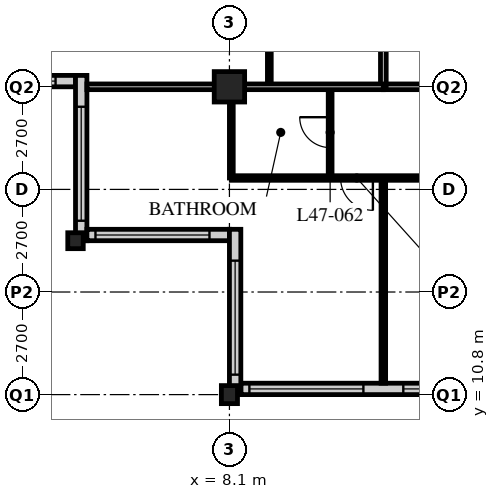
"""IFC4 building model, lengths in metres.
Left out: names, types, materials, properties, quantities, classifications, styles, units other than length and angle.
Written with IfcOpenShell. Run it as: python <this file> out.ifc"""

import sys

from ifc_helpers import new_model, si_unit, direction, frame, frame_2d, origin, origin_2d, place, context, subcontext, project, spatial, rectangle, hollow_rectangle, i_section, extrude, element, fill, save


model = new_model("IFC4")
c1 = context("Model", 3, precision=1e-05, world=origin(), true_north=direction((0.0, 1.0)))
c2 = subcontext(c1, "Body", "Model", "MODEL_VIEW")
j1 = project(units=[si_unit("LENGTHUNIT", "METRE"), si_unit("PLANEANGLEUNIT", "RADIAN")], contexts=[c1])
p1 = place(None, origin())
s1 = spatial("IfcSite", under=j1, at=p1, CompositionType="ELEMENT")
p2 = place(p1, origin())
s2 = spatial("IfcBuilding", under=s1, at=p2, CompositionType="ELEMENT")
p3 = place(p2, frame((0.0, 0.0, 184.8)))
s3 = spatial("IfcBuildingStorey", under=s2, at=p3, CompositionType="ELEMENT", Elevation=184.8)
p4 = place(p3, frame((4.05, 14.85, 0.0), z_axis=(0.0, 0.0, 1.0), x_axis=(1.0, 0.0, 0.0)))
e1 = element("IfcColumn", 1, at=p4, inside=s3, PredefinedType="COLUMN", context=c2, shape_type="SweptSolid", body=[
    extrude(i_section(OverallWidth=0.407, OverallDepth=0.419, WebThickness=0.031, FlangeThickness=0.049, FilletRadius=0.015, at=origin_2d()), origin(), (0.0, 0.0, 1.0), 3.6),
])
p5 = place(p3, frame((8.1, 10.8, 0.0), z_axis=(0.0, 0.0, 1.0), x_axis=(1.0, 0.0, 0.0)))
e2 = element("IfcColumn", 2, at=p5, inside=s3, PredefinedType="COLUMN", context=c2, shape_type="SweptSolid", body=[
    extrude(i_section(OverallWidth=0.424, OverallDepth=0.475, WebThickness=0.048, FlangeThickness=0.077, FilletRadius=0.015, at=origin_2d()), origin(), (0.0, 0.0, 1.0), 3.6),
])
p6 = place(p3, frame((8.1, 18.9, 0.0), z_axis=(0.0, 0.0, 1.0), x_axis=(1.0, 0.0, 0.0)))
e3 = element("IfcColumn", 3, at=p6, inside=s3, PredefinedType="COLUMN", context=c2, shape_type="SweptSolid", body=[
    extrude(hollow_rectangle(XDim=0.8, YDim=0.8, WallThickness=0.08, at=origin_2d()), origin(), (0.0, 0.0, 1.0), 3.6),
])
p7 = place(p3, frame((8.4, 10.95, 0.0), z_axis=(0.0, 0.0, 1.0), x_axis=(1.0, 0.0, 0.0)))
e4 = element("IfcWall", 4, at=p7, inside=s3, PredefinedType="SOLIDWALL", context=c2, shape_type="SweptSolid", body=[
    extrude(rectangle(XDim=40.2, YDim=0.3, at=frame_2d((20.1, 0.0))), origin(), (0.0, 0.0, 1.0), 3.39),
])
p8 = place(p7, frame((0.225, 0.0, 0.6)))
e5 = element("IfcOpeningElement", 5, at=p8, cuts=e4, PredefinedType="OPENING", context=c2, shape_type="SweptSolid", body=[
    extrude(rectangle(XDim=3.0, YDim=2.4, at=frame_2d((1.5, 1.2))), frame((0.0, 0.16, 0.0), z_axis=(0.0, -1.0, 0.0), x_axis=(1.0, 0.0, 0.0)), (0.0, 0.0, 1.0), 0.32),
])
p9 = place(p7, frame((4.275, 0.0, 0.6)))
e6 = element("IfcOpeningElement", 6, at=p9, cuts=e4, PredefinedType="OPENING", context=c2, shape_type="SweptSolid", body=[
    extrude(rectangle(XDim=3.0, YDim=2.4, at=frame_2d((1.5, 1.2))), frame((0.0, 0.16, 0.0), z_axis=(0.0, -1.0, 0.0), x_axis=(1.0, 0.0, 0.0)), (0.0, 0.0, 1.0), 0.32),
])
p10 = place(p7, frame((8.325, 0.0, 0.6)))
e7 = element("IfcOpeningElement", 7, at=p10, cuts=e4, PredefinedType="OPENING", context=c2, shape_type="SweptSolid", body=[
    extrude(rectangle(XDim=3.0, YDim=2.4, at=frame_2d((1.5, 1.2))), frame((0.0, 0.16, 0.0), z_axis=(0.0, -1.0, 0.0), x_axis=(1.0, 0.0, 0.0)), (0.0, 0.0, 1.0), 0.32),
])
p11 = place(p7, frame((12.375, 0.0, 0.6)))
e8 = element("IfcOpeningElement", 8, at=p11, cuts=e4, PredefinedType="OPENING", context=c2, shape_type="SweptSolid", body=[
    extrude(rectangle(XDim=3.0, YDim=2.4, at=frame_2d((1.5, 1.2))), frame((0.0, 0.16, 0.0), z_axis=(0.0, -1.0, 0.0), x_axis=(1.0, 0.0, 0.0)), (0.0, 0.0, 1.0), 0.32),
])
p12 = place(p7, frame((16.425, 0.0, 0.6)))
e9 = element("IfcOpeningElement", 9, at=p12, cuts=e4, PredefinedType="OPENING", context=c2, shape_type="SweptSolid", body=[
    extrude(rectangle(XDim=3.0, YDim=2.4, at=frame_2d((1.5, 1.2))), frame((0.0, 0.16, 0.0), z_axis=(0.0, -1.0, 0.0), x_axis=(1.0, 0.0, 0.0)), (0.0, 0.0, 1.0), 0.32),
])
p13 = place(p7, frame((20.475, 0.0, 0.6)))
e10 = element("IfcOpeningElement", 10, at=p13, cuts=e4, PredefinedType="OPENING", context=c2, shape_type="SweptSolid", body=[
    extrude(rectangle(XDim=3.0, YDim=2.4, at=frame_2d((1.5, 1.2))), frame((0.0, 0.16, 0.0), z_axis=(0.0, -1.0, 0.0), x_axis=(1.0, 0.0, 0.0)), (0.0, 0.0, 1.0), 0.32),
])
p14 = place(p7, frame((24.525, 0.0, 0.6)))
e11 = element("IfcOpeningElement", 11, at=p14, cuts=e4, PredefinedType="OPENING", context=c2, shape_type="SweptSolid", body=[
    extrude(rectangle(XDim=3.0, YDim=2.4, at=frame_2d((1.5, 1.2))), frame((0.0, 0.16, 0.0), z_axis=(0.0, -1.0, 0.0), x_axis=(1.0, 0.0, 0.0)), (0.0, 0.0, 1.0), 0.32),
])
p15 = place(p7, frame((28.575, 0.0, 0.6)))
e12 = element("IfcOpeningElement", 12, at=p15, cuts=e4, PredefinedType="OPENING", context=c2, shape_type="SweptSolid", body=[
    extrude(rectangle(XDim=3.0, YDim=2.4, at=frame_2d((1.5, 1.2))), frame((0.0, 0.16, 0.0), z_axis=(0.0, -1.0, 0.0), x_axis=(1.0, 0.0, 0.0)), (0.0, 0.0, 1.0), 0.32),
])
p16 = place(p7, frame((32.625, 0.0, 0.6)))
e13 = element("IfcOpeningElement", 13, at=p16, cuts=e4, PredefinedType="OPENING", context=c2, shape_type="SweptSolid", body=[
    extrude(rectangle(XDim=3.0, YDim=2.4, at=frame_2d((1.5, 1.2))), frame((0.0, 0.16, 0.0), z_axis=(0.0, -1.0, 0.0), x_axis=(1.0, 0.0, 0.0)), (0.0, 0.0, 1.0), 0.32),
])
p17 = place(p7, frame((36.675, 0.0, 0.6)))
e14 = element("IfcOpeningElement", 14, at=p17, cuts=e4, PredefinedType="OPENING", context=c2, shape_type="SweptSolid", body=[
    extrude(rectangle(XDim=3.0, YDim=2.4, at=frame_2d((1.5, 1.2))), frame((0.0, 0.16, 0.0), z_axis=(0.0, -1.0, 0.0), x_axis=(1.0, 0.0, 0.0)), (0.0, 0.0, 1.0), 0.32),
])
p18 = place(p3, frame((0.3, 19.05, 0.0), z_axis=(0.0, 0.0, 1.0), x_axis=(1.0, 0.0, 0.0)))
e15 = element("IfcWall", 15, at=p18, inside=s3, PredefinedType="SOLIDWALL", context=c2, shape_type="SweptSolid", body=[
    extrude(rectangle(XDim=3.75, YDim=0.3, at=frame_2d((1.875, 0.0))), origin(), (0.0, 0.0, 1.0), 3.39),
])
p19 = place(p18, frame((0.225, 0.0, 0.6)))
e16 = element("IfcOpeningElement", 16, at=p19, cuts=e15, PredefinedType="OPENING", context=c2, shape_type="SweptSolid", body=[
    extrude(rectangle(XDim=3.0, YDim=2.0, at=frame_2d((1.5, 1.0))), frame((0.0, 0.16, 0.0), z_axis=(0.0, -1.0, 0.0), x_axis=(1.0, 0.0, 0.0)), (0.0, 0.0, 1.0), 0.32),
])
p20 = place(p3, frame((4.2, 19.2, 0.0), z_axis=(0.0, 0.0, 1.0), x_axis=(0.0, -1.0, 0.0)))
e17 = element("IfcWall", 17, at=p20, inside=s3, PredefinedType="SOLIDWALL", context=c2, shape_type="SweptSolid", body=[
    extrude(rectangle(XDim=4.35, YDim=0.3, at=frame_2d((2.175, 0.0))), origin(), (0.0, 0.0, 1.0), 3.39),
])
p21 = place(p20, frame((0.825, 0.0, 0.6)))
e18 = element("IfcOpeningElement", 18, at=p21, cuts=e17, PredefinedType="OPENING", context=c2, shape_type="SweptSolid", body=[
    extrude(rectangle(XDim=3.0, YDim=2.0, at=frame_2d((1.5, 1.0))), frame((0.0, 0.16, 0.0), z_axis=(0.0, -1.0, 0.0), x_axis=(1.0, 0.0, 0.0)), (0.0, 0.0, 1.0), 0.32),
])
p22 = place(p3, frame((4.35, 15.0, 0.0), z_axis=(0.0, 0.0, 1.0), x_axis=(1.0, 0.0, 0.0)))
e19 = element("IfcWall", 19, at=p22, inside=s3, PredefinedType="SOLIDWALL", context=c2, shape_type="SweptSolid", body=[
    extrude(rectangle(XDim=3.75, YDim=0.3, at=frame_2d((1.875, 0.0))), origin(), (0.0, 0.0, 1.0), 3.39),
])
p23 = place(p22, frame((0.225, 0.0, 0.6)))
e20 = element("IfcOpeningElement", 20, at=p23, cuts=e19, PredefinedType="OPENING", context=c2, shape_type="SweptSolid", body=[
    extrude(rectangle(XDim=3.0, YDim=2.0, at=frame_2d((1.5, 1.0))), frame((0.0, 0.16, 0.0), z_axis=(0.0, -1.0, 0.0), x_axis=(1.0, 0.0, 0.0)), (0.0, 0.0, 1.0), 0.32),
])
p24 = place(p3, frame((8.25, 15.15, 0.0), z_axis=(0.0, 0.0, 1.0), x_axis=(0.0, -1.0, 0.0)))
e21 = element("IfcWall", 21, at=p24, inside=s3, PredefinedType="SOLIDWALL", context=c2, shape_type="SweptSolid", body=[
    extrude(rectangle(XDim=4.35, YDim=0.3, at=frame_2d((2.175, 0.0))), origin(), (0.0, 0.0, 1.0), 3.39),
])
p25 = place(p24, frame((0.825, 0.0, 0.6)))
e22 = element("IfcOpeningElement", 22, at=p25, cuts=e21, PredefinedType="OPENING", context=c2, shape_type="SweptSolid", body=[
    extrude(rectangle(XDim=3.0, YDim=2.0, at=frame_2d((1.5, 1.0))), frame((0.0, 0.16, 0.0), z_axis=(0.0, -1.0, 0.0), x_axis=(1.0, 0.0, 0.0)), (0.0, 0.0, 1.0), 0.32),
])
p26 = place(p3, frame((12.15, 18.9, 0.0), z_axis=(0.0, 0.0, 1.0), x_axis=(1.0, 0.0, 0.0)))
e23 = element("IfcWall", 23, at=p26, inside=s3, PredefinedType="PARTITIONING", context=c2, shape_type="SweptSolid", body=[
    extrude(rectangle(XDim=32.4, YDim=0.15, at=frame_2d((16.2, 0.0))), origin(), (0.0, 0.0, 1.0), 2.778),
])
p27 = place(p26, frame((4.95, 0.0, 0.0)))
e24 = element("IfcOpeningElement", 24, at=p27, cuts=e23, PredefinedType="OPENING", context=c2, shape_type="SweptSolid", body=[
    extrude(rectangle(XDim=1.0, YDim=2.1, at=frame_2d((0.5, 1.05))), frame((0.0, 0.085, 0.0), z_axis=(0.0, -1.0, 0.0), x_axis=(1.0, 0.0, 0.0)), (0.0, 0.0, 1.0), 0.17),
])
p28 = place(p26, frame((13.05, 0.0, 0.0)))
e25 = element("IfcOpeningElement", 25, at=p28, cuts=e23, PredefinedType="OPENING", context=c2, shape_type="SweptSolid", body=[
    extrude(rectangle(XDim=1.0, YDim=2.1, at=frame_2d((0.5, 1.05))), frame((0.0, 0.085, 0.0), z_axis=(0.0, -1.0, 0.0), x_axis=(1.0, 0.0, 0.0)), (0.0, 0.0, 1.0), 0.17),
])
p29 = place(p26, frame((21.15, 0.0, 0.0)))
e26 = element("IfcOpeningElement", 26, at=p29, cuts=e23, PredefinedType="OPENING", context=c2, shape_type="SweptSolid", body=[
    extrude(rectangle(XDim=1.0, YDim=2.1, at=frame_2d((0.5, 1.05))), frame((0.0, 0.085, 0.0), z_axis=(0.0, -1.0, 0.0), x_axis=(1.0, 0.0, 0.0)), (0.0, 0.0, 1.0), 0.17),
])
p30 = place(p26, frame((1.525, 0.0, 0.0)))
e27 = element("IfcOpeningElement", 27, at=p30, cuts=e23, PredefinedType="OPENING", context=c2, shape_type="SweptSolid", body=[
    extrude(rectangle(XDim=1.0, YDim=2.1, at=frame_2d((0.5, 1.05))), frame((0.0, 0.085, 0.0), z_axis=(0.0, -1.0, 0.0), x_axis=(1.0, 0.0, 0.0)), (0.0, 0.0, 1.0), 0.17),
])
p31 = place(p26, frame((29.875, 0.0, 0.0)))
e28 = element("IfcOpeningElement", 28, at=p31, cuts=e23, PredefinedType="OPENING", context=c2, shape_type="SweptSolid", body=[
    extrude(rectangle(XDim=1.0, YDim=2.1, at=frame_2d((0.5, 1.05))), frame((0.0, 0.085, 0.0), z_axis=(0.0, -1.0, 0.0), x_axis=(1.0, 0.0, 0.0)), (0.0, 0.0, 1.0), 0.17),
])
p32 = place(p3, frame((12.15, 18.9, 0.0), z_axis=(0.0, 0.0, 1.0), x_axis=(0.0, 1.0, 0.0)))
e29 = element("IfcWall", 29, at=p32, inside=s3, PredefinedType="PARTITIONING", context=c2, shape_type="SweptSolid", body=[
    extrude(rectangle(XDim=28.35, YDim=0.15, at=frame_2d((14.175, 0.0))), origin(), (0.0, 0.0, 1.0), 3.39),
])
p33 = place(p32, frame((2.35, 0.0, 0.0)))
e30 = element("IfcOpeningElement", 30, at=p33, cuts=e29, PredefinedType="OPENING", context=c2, shape_type="SweptSolid", body=[
    extrude(rectangle(XDim=1.0, YDim=2.1, at=frame_2d((0.5, 1.05))), frame((0.0, 0.085, 0.0), z_axis=(0.0, -1.0, 0.0), x_axis=(1.0, 0.0, 0.0)), (0.0, 0.0, 1.0), 0.17),
])
p34 = place(p32, frame((6.4, 0.0, 0.0)))
e31 = element("IfcOpeningElement", 31, at=p34, cuts=e29, PredefinedType="OPENING", context=c2, shape_type="SweptSolid", body=[
    extrude(rectangle(XDim=1.0, YDim=2.1, at=frame_2d((0.5, 1.05))), frame((0.0, 0.085, 0.0), z_axis=(0.0, -1.0, 0.0), x_axis=(1.0, 0.0, 0.0)), (0.0, 0.0, 1.0), 0.17),
])
p35 = place(p32, frame((8.5, 0.0, 0.0)))
e32 = element("IfcOpeningElement", 32, at=p35, cuts=e29, PredefinedType="OPENING", context=c2, shape_type="SweptSolid", body=[
    extrude(rectangle(XDim=1.0, YDim=2.1, at=frame_2d((0.5, 1.05))), frame((0.0, 0.085, 0.0), z_axis=(0.0, -1.0, 0.0), x_axis=(1.0, 0.0, 0.0)), (0.0, 0.0, 1.0), 0.17),
])
p36 = place(p32, frame((16.6, 0.0, 0.0)))
e33 = element("IfcOpeningElement", 33, at=p36, cuts=e29, PredefinedType="OPENING", context=c2, shape_type="SweptSolid", body=[
    extrude(rectangle(XDim=1.0, YDim=2.1, at=frame_2d((0.5, 1.05))), frame((0.0, 0.085, 0.0), z_axis=(0.0, -1.0, 0.0), x_axis=(1.0, 0.0, 0.0)), (0.0, 0.0, 1.0), 0.17),
])
p37 = place(p32, frame((26.65, 0.0, 0.0)))
e34 = element("IfcOpeningElement", 34, at=p37, cuts=e29, PredefinedType="OPENING", context=c2, shape_type="SweptSolid", body=[
    extrude(rectangle(XDim=1.0, YDim=2.1, at=frame_2d((0.5, 1.05))), frame((0.0, 0.085, 0.0), z_axis=(0.0, -1.0, 0.0), x_axis=(1.0, 0.0, 0.0)), (0.0, 0.0, 1.0), 0.17),
])
p38 = place(p3, frame((9.15, 18.9, 0.0), z_axis=(0.0, 0.0, 1.0), x_axis=(0.0, 1.0, 0.0)))
e35 = element("IfcWall", 35, at=p38, inside=s3, PredefinedType="PARTITIONING", context=c2, shape_type="SweptSolid", body=[
    extrude(rectangle(XDim=2.2, YDim=0.1, at=frame_2d((1.1, 0.0))), origin(), (0.0, 0.0, 1.0), 3.39),
])
p39 = place(p3, frame((10.75, 18.9, 0.0), z_axis=(0.0, 0.0, 1.0), x_axis=(0.0, -1.0, 0.0)))
e36 = element("IfcWall", 36, at=p39, inside=s3, PredefinedType="PARTITIONING", context=c2, shape_type="SweptSolid", body=[
    extrude(rectangle(XDim=2.4, YDim=0.1, at=frame_2d((1.2, 0.0))), origin(), (0.0, 0.0, 1.0), 3.39),
])
p40 = place(p39, frame((0.8, 0.0, 0.0)))
e37 = element("IfcOpeningElement", 37, at=p40, cuts=e36, PredefinedType="OPENING", context=c2, shape_type="SweptSolid", body=[
    extrude(rectangle(XDim=0.8, YDim=2.1, at=frame_2d((0.4, 1.05))), frame((0.0, 0.06, 0.0), z_axis=(0.0, -1.0, 0.0), x_axis=(1.0, 0.0, 0.0)), (0.0, 0.0, 1.0), 0.12),
])
p41 = place(p3, frame((8.15, 18.9, 0.0), z_axis=(0.0, 0.0, 1.0), x_axis=(0.0, -1.0, 0.0)))
e38 = element("IfcWall", 38, at=p41, inside=s3, PredefinedType="PARTITIONING", context=c2, shape_type="SweptSolid", body=[
    extrude(rectangle(XDim=2.4, YDim=0.1, at=frame_2d((1.2, 0.0))), origin(), (0.0, 0.0, 1.0), 2.778),
])
p42 = place(p3, frame((8.15, 16.5, 0.0), z_axis=(0.0, 0.0, 1.0), x_axis=(1.0, 0.0, 0.0)))
e39 = element("IfcWall", 39, at=p42, inside=s3, PredefinedType="PARTITIONING", context=c2, shape_type="SweptSolid", body=[
    extrude(rectangle(XDim=40.4, YDim=0.12, at=frame_2d((20.2, 0.0))), origin(), (0.0, 0.0, 1.0), 3.39),
])
p43 = place(p42, frame((9.025, 0.0, 0.0)))
e40 = element("IfcOpeningElement", 40, at=p43, cuts=e39, PredefinedType="OPENING", context=c2, shape_type="SweptSolid", body=[
    extrude(rectangle(XDim=0.85, YDim=2.1, at=frame_2d((0.425, 1.05))), frame((0.0, 0.07, 0.0), z_axis=(0.0, -1.0, 0.0), x_axis=(1.0, 0.0, 0.0)), (0.0, 0.0, 1.0), 0.14),
])
p44 = place(p42, frame((12.425, 0.0, 0.0)))
e41 = element("IfcOpeningElement", 41, at=p44, cuts=e39, PredefinedType="OPENING", context=c2, shape_type="SweptSolid", body=[
    extrude(rectangle(XDim=0.85, YDim=2.1, at=frame_2d((0.425, 1.05))), frame((0.0, 0.07, 0.0), z_axis=(0.0, -1.0, 0.0), x_axis=(1.0, 0.0, 0.0)), (0.0, 0.0, 1.0), 0.14),
])
p45 = place(p42, frame((17.125, 0.0, 0.0)))
e42 = element("IfcOpeningElement", 42, at=p45, cuts=e39, PredefinedType="OPENING", context=c2, shape_type="SweptSolid", body=[
    extrude(rectangle(XDim=0.85, YDim=2.1, at=frame_2d((0.425, 1.05))), frame((0.0, 0.07, 0.0), z_axis=(0.0, -1.0, 0.0), x_axis=(1.0, 0.0, 0.0)), (0.0, 0.0, 1.0), 0.14),
])
p46 = place(p42, frame((20.525, 0.0, 0.0)))
e43 = element("IfcOpeningElement", 43, at=p46, cuts=e39, PredefinedType="OPENING", context=c2, shape_type="SweptSolid", body=[
    extrude(rectangle(XDim=0.85, YDim=2.1, at=frame_2d((0.425, 1.05))), frame((0.0, 0.07, 0.0), z_axis=(0.0, -1.0, 0.0), x_axis=(1.0, 0.0, 0.0)), (0.0, 0.0, 1.0), 0.14),
])
p47 = place(p42, frame((25.225, 0.0, 0.0)))
e44 = element("IfcOpeningElement", 44, at=p47, cuts=e39, PredefinedType="OPENING", context=c2, shape_type="SweptSolid", body=[
    extrude(rectangle(XDim=0.85, YDim=2.1, at=frame_2d((0.425, 1.05))), frame((0.0, 0.07, 0.0), z_axis=(0.0, -1.0, 0.0), x_axis=(1.0, 0.0, 0.0)), (0.0, 0.0, 1.0), 0.14),
])
p48 = place(p42, frame((28.625, 0.0, 0.0)))
e45 = element("IfcOpeningElement", 45, at=p48, cuts=e39, PredefinedType="OPENING", context=c2, shape_type="SweptSolid", body=[
    extrude(rectangle(XDim=0.85, YDim=2.1, at=frame_2d((0.425, 1.05))), frame((0.0, 0.07, 0.0), z_axis=(0.0, -1.0, 0.0), x_axis=(1.0, 0.0, 0.0)), (0.0, 0.0, 1.0), 0.14),
])
p49 = place(p42, frame((6.725, 0.0, 0.0)))
e46 = element("IfcOpeningElement", 46, at=p49, cuts=e39, PredefinedType="OPENING", context=c2, shape_type="SweptSolid", body=[
    extrude(rectangle(XDim=0.85, YDim=2.1, at=frame_2d((0.425, 1.05))), frame((0.0, 0.07, 0.0), z_axis=(0.0, -1.0, 0.0), x_axis=(1.0, 0.0, 0.0)), (0.0, 0.0, 1.0), 0.14),
])
p50 = place(p42, frame((2.875, 0.0, 0.0)))
e47 = element("IfcOpeningElement", 47, at=p50, cuts=e39, PredefinedType="OPENING", context=c2, shape_type="SweptSolid", body=[
    extrude(rectangle(XDim=0.85, YDim=2.1, at=frame_2d((0.425, 1.05))), frame((0.0, 0.07, 0.0), z_axis=(0.0, -1.0, 0.0), x_axis=(1.0, 0.0, 0.0)), (0.0, 0.0, 1.0), 0.14),
])
p51 = place(p42, frame((32.825, 0.0, 0.0)))
e48 = element("IfcOpeningElement", 48, at=p51, cuts=e39, PredefinedType="OPENING", context=c2, shape_type="SweptSolid", body=[
    extrude(rectangle(XDim=0.85, YDim=2.1, at=frame_2d((0.425, 1.05))), frame((0.0, 0.07, 0.0), z_axis=(0.0, -1.0, 0.0), x_axis=(1.0, 0.0, 0.0)), (0.0, 0.0, 1.0), 0.14),
])
p52 = place(p42, frame((36.675, 0.0, 0.0)))
e49 = element("IfcOpeningElement", 49, at=p52, cuts=e39, PredefinedType="OPENING", context=c2, shape_type="SweptSolid", body=[
    extrude(rectangle(XDim=0.85, YDim=2.1, at=frame_2d((0.425, 1.05))), frame((0.0, 0.07, 0.0), z_axis=(0.0, -1.0, 0.0), x_axis=(1.0, 0.0, 0.0)), (0.0, 0.0, 1.0), 0.14),
])
p53 = place(p3, frame((12.15, 16.5, 0.0), z_axis=(0.0, 0.0, 1.0), x_axis=(0.0, -1.0, 0.0)))
e50 = element("IfcWall", 50, at=p53, inside=s3, PredefinedType="PARTITIONING", context=c2, shape_type="SweptSolid", body=[
    extrude(rectangle(XDim=5.4, YDim=0.12, at=frame_2d((2.7, 0.0))), origin(), (0.0, 0.0, 1.0), 3.39),
])
p54 = place(p3, frame((4.35, 18.9, 0.0), z_axis=(0.0, 0.0, 1.0), x_axis=(1.0, 0.0, 0.0)))
e51 = element("IfcWall", 51, at=p54, inside=s3, PredefinedType="PARTITIONING", context=c2, shape_type="SweptSolid", body=[
    extrude(rectangle(XDim=7.8, YDim=0.15, at=frame_2d((3.9, 0.0))), origin(), (0.0, 0.0, 1.0), 2.778),
])
p55 = place(p8, origin())
e52 = element("IfcWindow", 52, at=p55, inside=s3, PartitioningType="SINGLE_PANEL", PredefinedType="WINDOW", context=c2, shape_type="SweptSolid", body=[
    extrude(rectangle(XDim=3.0, YDim=2.4, at=frame_2d((1.5, 1.2))), frame((0.0, 0.03, 0.0), z_axis=(0.0, -1.0, 0.0), x_axis=(1.0, 0.0, 0.0)), (0.0, 0.0, 1.0), 0.06),
])
fill(e5, e52)
p56 = place(p9, origin())
e53 = element("IfcWindow", 53, at=p56, inside=s3, PartitioningType="SINGLE_PANEL", PredefinedType="WINDOW", context=c2, shape_type="SweptSolid", body=[
    extrude(rectangle(XDim=3.0, YDim=2.4, at=frame_2d((1.5, 1.2))), frame((0.0, 0.03, 0.0), z_axis=(0.0, -1.0, 0.0), x_axis=(1.0, 0.0, 0.0)), (0.0, 0.0, 1.0), 0.06),
])
fill(e6, e53)
p57 = place(p19, origin())
e54 = element("IfcWindow", 54, at=p57, inside=s3, PartitioningType="SINGLE_PANEL", PredefinedType="WINDOW", context=c2, shape_type="SweptSolid", body=[
    extrude(rectangle(XDim=3.0, YDim=2.0, at=frame_2d((1.5, 1.0))), frame((0.0, 0.03, 0.0), z_axis=(0.0, -1.0, 0.0), x_axis=(1.0, 0.0, 0.0)), (0.0, 0.0, 1.0), 0.06),
])
fill(e16, e54)
p58 = place(p21, origin())
e55 = element("IfcWindow", 55, at=p58, inside=s3, PartitioningType="SINGLE_PANEL", PredefinedType="WINDOW", context=c2, shape_type="SweptSolid", body=[
    extrude(rectangle(XDim=3.0, YDim=2.0, at=frame_2d((1.5, 1.0))), frame((0.0, 0.03, 0.0), z_axis=(0.0, -1.0, 0.0), x_axis=(1.0, 0.0, 0.0)), (0.0, 0.0, 1.0), 0.06),
])
fill(e18, e55)
p59 = place(p23, origin())
e56 = element("IfcWindow", 56, at=p59, inside=s3, PartitioningType="SINGLE_PANEL", PredefinedType="WINDOW", context=c2, shape_type="SweptSolid", body=[
    extrude(rectangle(XDim=3.0, YDim=2.0, at=frame_2d((1.5, 1.0))), frame((0.0, 0.03, 0.0), z_axis=(0.0, -1.0, 0.0), x_axis=(1.0, 0.0, 0.0)), (0.0, 0.0, 1.0), 0.06),
])
fill(e20, e56)
p60 = place(p25, origin())
e57 = element("IfcWindow", 57, at=p60, inside=s3, PartitioningType="SINGLE_PANEL", PredefinedType="WINDOW", context=c2, shape_type="SweptSolid", body=[
    extrude(rectangle(XDim=3.0, YDim=2.0, at=frame_2d((1.5, 1.0))), frame((0.0, 0.03, 0.0), z_axis=(0.0, -1.0, 0.0), x_axis=(1.0, 0.0, 0.0)), (0.0, 0.0, 1.0), 0.06),
])
fill(e22, e57)
p61 = place(p40, origin())
e58 = element("IfcDoor", 58, at=p61, inside=s3, OperationType="SINGLE_SWING_RIGHT", PredefinedType="DOOR", context=c2, shape_type="SweptSolid", body=[
    extrude(rectangle(XDim=0.8, YDim=2.1, at=frame_2d((0.4, 1.05))), frame((0.0, 0.025, 0.0), z_axis=(0.0, -1.0, 0.0), x_axis=(1.0, 0.0, 0.0)), (0.0, 0.0, 1.0), 0.05),
])
fill(e37, e58)
p62 = place(p50, origin())
e59 = element("IfcDoor", 59, at=p62, inside=s3, OperationType="SINGLE_SWING_LEFT", PredefinedType="DOOR", context=c2, shape_type="SweptSolid", body=[
    extrude(rectangle(XDim=0.85, YDim=2.1, at=frame_2d((0.425, 1.05))), frame((0.0, 0.025, 0.0), z_axis=(0.0, -1.0, 0.0), x_axis=(1.0, 0.0, 0.0)), (0.0, 0.0, 1.0), 0.05),
])
fill(e47, e59)
save(model, sys.argv[1])
